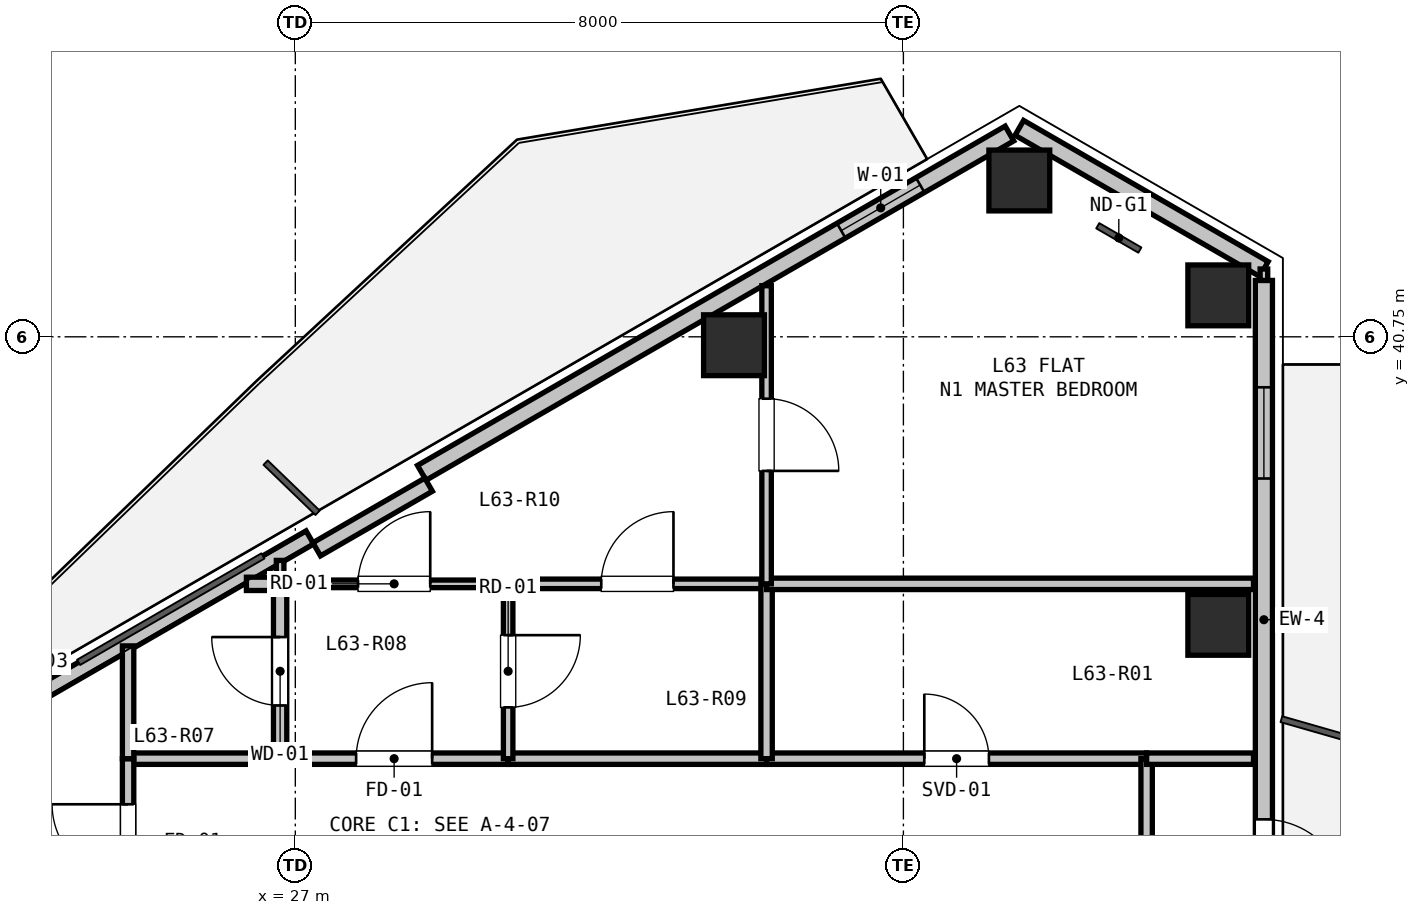
"""IFC4 building model, lengths in metres.
Left out: names, types, materials, properties, quantities, classifications, styles, units other than length and angle.
Written with IfcOpenShell. Run it as: python <this file> out.ifc"""

import sys

from ifc_helpers import new_model, si_unit, direction, frame, frame_2d, origin, origin_2d, place, context, subcontext, project, spatial, rectangle, hollow_rectangle, extrude, element, fill, save


model = new_model("IFC4")
c1 = context("Model", 3, precision=1e-05, world=origin(), true_north=direction((0.0, 1.0)))
c2 = subcontext(c1, "Body", "Model", "MODEL_VIEW")
j1 = project(units=[si_unit("LENGTHUNIT", "METRE"), si_unit("PLANEANGLEUNIT", "RADIAN")], contexts=[c1])
p1 = place(None, origin())
s1 = spatial("IfcSite", under=j1, at=p1, CompositionType="ELEMENT")
p2 = place(p1, origin())
s2 = spatial("IfcBuilding", under=s1, at=p2, CompositionType="ELEMENT")
p3 = place(p2, frame((0.0, 0.0, 226.5)))
s3 = spatial("IfcBuildingStorey", under=s2, at=p3, CompositionType="ELEMENT", Elevation=226.5)
for number, where, z_axis, x_axis in (
    (1, (32.771, 40.639, 0.0), (0.0, 0.0, 1.0), (1.0, 0.0, 0.0)),
    (2, (36.525, 42.807, 0.0), (0.0, 0.0, 1.0), (1.0, 0.0, 0.0)),
    (3, (39.143, 41.295, 0.0), (0.0, 0.0, 1.0), (1.0, 0.0, 0.0)),
    (4, (39.143, 36.961, 0.0), (0.0, 0.0, 1.0), (1.0, 0.0, 0.0)),
):
    element("IfcColumn", number, at=place(p3, frame(where, z_axis=z_axis, x_axis=x_axis)), inside=s3, PredefinedType="COLUMN", context=c2, shape_type="SweptSolid", body=[
        extrude(hollow_rectangle(XDim=0.8, YDim=0.8, WallThickness=0.025, at=origin_2d()), origin(), (0.0, 0.0, 1.0), 3.3),
    ])
p4 = place(p3, frame((36.525, 43.5, 0.0), z_axis=(0.0, 0.0, 1.0), x_axis=(0.866038962515, -0.499976514854, 0.0)))
e5 = element("IfcWall", 5, at=p4, inside=s3, PredefinedType="SOLIDWALL", context=c2, shape_type="SweptSolid", body=[
    extrude(rectangle(XDim=3.716, YDim=0.225, at=frame_2d((1.858, 0.0))), origin(), (0.0, 0.0, 1.0), 2.7),
])
p5 = place(p3, frame((20.066, 33.997, 0.0), z_axis=(0.0, 0.0, 1.0), x_axis=(0.866019557082, 0.500010126649, 0.0)))
e6 = element("IfcWall", 6, at=p5, inside=s3, PredefinedType="PARAPET", context=c2, shape_type="SweptSolid", body=[
    extrude(rectangle(XDim=8.228, YDim=0.2, at=frame_2d((4.114, 0.0))), origin(), (0.0, 0.0, 1.0), 0.2),
])
p6 = place(p3, frame((28.664, 38.96, 0.0), z_axis=(0.0, 0.0, 1.0), x_axis=(0.866026655105, 0.499997832642, 0.0)))
e7 = element("IfcWall", 7, at=p6, inside=s3, PredefinedType="SOLIDWALL", context=c2, shape_type="SweptSolid", body=[
    extrude(rectangle(XDim=8.928, YDim=0.225, at=frame_2d((4.464, 0.0))), origin(), (0.0, 0.0, 1.0), 2.7),
])
p7 = place(p6, frame((6.372, 0.0, 0.9)))
e8 = element("IfcOpeningElement", 8, at=p7, cuts=e7, PredefinedType="OPENING", context=c2, shape_type="SweptSolid", body=[
    extrude(rectangle(XDim=1.2, YDim=1.4, at=frame_2d((0.6, 0.7))), frame((0.0, 0.123, 0.0), z_axis=(0.0, -1.0, 0.0), x_axis=(1.0, 0.0, 0.0)), (0.0, 0.0, 1.0), 0.245),
])
p8 = place(p3, frame((27.281, 37.955, 0.0), z_axis=(0.0, 0.0, 1.0), x_axis=(0.866025371046, 0.500000056704, 0.0)))
e9 = element("IfcWall", 9, at=p8, inside=s3, PredefinedType="PARAPET", context=c2, shape_type="SweptSolid", body=[
    extrude(rectangle(XDim=1.7, YDim=0.2, at=frame_2d((0.85, 0.0))), origin(), (0.0, 0.0, 1.0), 2.7),
])
p9 = place(p3, frame((39.743, 41.492, 0.0), z_axis=(0.0, 0.0, 1.0), x_axis=(0.0, -1.0, 0.0)))
e10 = element("IfcWall", 10, at=p9, inside=s3, PredefinedType="SOLIDWALL", context=c2, shape_type="SweptSolid", body=[
    extrude(rectangle(XDim=8.928, YDim=0.225, at=frame_2d((4.464, 0.0))), origin(), (0.0, 0.0, 1.0), 2.7),
])
p10 = place(p9, frame((7.09, 0.0, 0.0)))
e11 = element("IfcOpeningElement", 11, at=p10, cuts=e10, PredefinedType="OPENING", context=c2, shape_type="SweptSolid", body=[
    extrude(rectangle(XDim=1.1, YDim=2.1, at=frame_2d((0.55, 1.05))), frame((0.0, 0.123, 0.0), z_axis=(0.0, -1.0, 0.0), x_axis=(1.0, 0.0, 0.0)), (0.0, 0.0, 1.0), 0.245),
])
p11 = place(p9, frame((1.406, 0.0, 0.9)))
e12 = element("IfcOpeningElement", 12, at=p11, cuts=e10, PredefinedType="OPENING", context=c2, shape_type="SweptSolid", body=[
    extrude(rectangle(XDim=1.2, YDim=1.4, at=frame_2d((0.6, 0.7))), frame((0.0, 0.123, 0.0), z_axis=(0.0, -1.0, 0.0), x_axis=(1.0, 0.0, 0.0)), (0.0, 0.0, 1.0), 0.245),
])
p12 = place(p3, frame((24.8, 35.2, 0.0), z_axis=(0.0, 0.0, 1.0), x_axis=(1.0, 0.0, 0.0)))
e13 = element("IfcWall", 13, at=p12, inside=s3, PredefinedType="PARTITIONING", context=c2, shape_type="SweptSolid", body=[
    extrude(rectangle(XDim=2.0, YDim=0.15, at=frame_2d((1.0, 0.0))), origin(), (0.0, 0.0, 1.0), 3.08),
])
p13 = place(p3, frame((26.8, 35.2, 0.0), z_axis=(0.0, 0.0, 1.0), x_axis=(1.0, 0.0, 0.0)))
e14 = element("IfcWall", 14, at=p13, inside=s3, PredefinedType="PARTITIONING", context=c2, shape_type="SweptSolid", body=[
    extrude(rectangle(XDim=3.0, YDim=0.15, at=frame_2d((1.5, 0.0))), origin(), (0.0, 0.0, 1.0), 3.08),
])
p14 = place(p13, frame((1.0, 0.0, 0.0)))
e15 = element("IfcOpeningElement", 15, at=p14, cuts=e14, PredefinedType="OPENING", context=c2, shape_type="SweptSolid", body=[
    extrude(rectangle(XDim=1.0, YDim=2.15, at=frame_2d((0.5, 1.075))), frame((0.0, 0.085, 0.0), z_axis=(0.0, -1.0, 0.0), x_axis=(1.0, 0.0, 0.0)), (0.0, 0.0, 1.0), 0.17),
])
p15 = place(p3, frame((29.8, 35.2, 0.0), z_axis=(0.0, 0.0, 1.0), x_axis=(1.0, 0.0, 0.0)))
e16 = element("IfcWall", 16, at=p15, inside=s3, PredefinedType="PARTITIONING", context=c2, shape_type="SweptSolid", body=[
    extrude(rectangle(XDim=3.4, YDim=0.15, at=frame_2d((1.7, 0.0))), origin(), (0.0, 0.0, 1.0), 3.08),
])
p16 = place(p3, frame((33.2, 35.2, 0.0), z_axis=(0.0, 0.0, 1.0), x_axis=(1.0, 0.0, 0.0)))
e17 = element("IfcWall", 17, at=p16, inside=s3, PredefinedType="PARTITIONING", context=c2, shape_type="SweptSolid", body=[
    extrude(rectangle(XDim=5.0, YDim=0.15, at=frame_2d((2.5, 0.0))), origin(), (0.0, 0.0, 1.0), 2.528),
])
p17 = place(p16, frame((2.075, 0.0, 0.0)))
e18 = element("IfcOpeningElement", 18, at=p17, cuts=e17, PredefinedType="OPENING", context=c2, shape_type="SweptSolid", body=[
    extrude(rectangle(XDim=0.85, YDim=2.1, at=frame_2d((0.425, 1.05))), frame((0.0, 0.085, 0.0), z_axis=(0.0, -1.0, 0.0), x_axis=(1.0, 0.0, 0.0)), (0.0, 0.0, 1.0), 0.17),
])
p18 = place(p3, frame((38.2, 35.2, 0.0), z_axis=(0.0, 0.0, 1.0), x_axis=(0.0, -1.0, 0.0)))
e19 = element("IfcWall", 19, at=p18, inside=s3, PredefinedType="PARTITIONING", context=c2, shape_type="SweptSolid", body=[
    extrude(rectangle(XDim=2.45, YDim=0.15, at=frame_2d((1.225, 0.0))), origin(), (0.0, 0.0, 1.0), 3.08),
])
p19 = place(p3, frame((24.8, 33.0, 0.0), z_axis=(0.0, 0.0, 1.0), x_axis=(0.0, 1.0, 0.0)))
e20 = element("IfcWall", 20, at=p19, inside=s3, PredefinedType="PARTITIONING", context=c2, shape_type="SweptSolid", body=[
    extrude(rectangle(XDim=2.2, YDim=0.15, at=frame_2d((1.1, 0.0))), origin(), (0.0, 0.0, 1.0), 2.605),
])
p20 = place(p19, frame((0.6, 0.0, 0.0)))
e21 = element("IfcOpeningElement", 21, at=p20, cuts=e20, PredefinedType="OPENING", context=c2, shape_type="SweptSolid", body=[
    extrude(rectangle(XDim=1.0, YDim=2.15, at=frame_2d((0.5, 1.075))), frame((0.0, 0.085, 0.0), z_axis=(0.0, -1.0, 0.0), x_axis=(1.0, 0.0, 0.0)), (0.0, 0.0, 1.0), 0.17),
])
p21 = place(p3, frame((26.8, 37.5, 0.0), z_axis=(0.0, 0.0, 1.0), x_axis=(1.0, 0.0, 0.0)))
e22 = element("IfcWall", 22, at=p21, inside=s3, PredefinedType="PARTITIONING", context=c2, shape_type="SweptSolid", body=[
    extrude(rectangle(XDim=3.0, YDim=0.1, at=frame_2d((1.5, 0.0))), origin(), (0.0, 0.0, 1.0), 2.365),
])
p22 = place(p21, frame((1.025, 0.0, 0.0)))
e23 = element("IfcOpeningElement", 23, at=p22, cuts=e22, PredefinedType="OPENING", context=c2, shape_type="SweptSolid", body=[
    extrude(rectangle(XDim=0.95, YDim=2.1, at=frame_2d((0.475, 1.05))), frame((0.0, 0.06, 0.0), z_axis=(0.0, -1.0, 0.0), x_axis=(1.0, 0.0, 0.0)), (0.0, 0.0, 1.0), 0.12),
])
p23 = place(p3, frame((29.8, 37.5, 0.0), z_axis=(0.0, 0.0, 1.0), x_axis=(0.0, -1.0, 0.0)))
e24 = element("IfcWall", 24, at=p23, inside=s3, PredefinedType="PARTITIONING", context=c2, shape_type="SweptSolid", body=[
    extrude(rectangle(XDim=2.3, YDim=0.125, at=frame_2d((1.15, 0.0))), origin(), (0.0, 0.0, 1.0), 3.08),
])
p24 = place(p23, frame((0.675, 0.0, 0.0)))
e25 = element("IfcOpeningElement", 25, at=p24, cuts=e24, PredefinedType="OPENING", context=c2, shape_type="SweptSolid", body=[
    extrude(rectangle(XDim=0.95, YDim=2.1, at=frame_2d((0.475, 1.05))), frame((0.0, 0.073, 0.0), z_axis=(0.0, -1.0, 0.0), x_axis=(1.0, 0.0, 0.0)), (0.0, 0.0, 1.0), 0.145),
])
p25 = place(p3, frame((26.8, 35.2, 0.0), z_axis=(0.0, 0.0, 1.0), x_axis=(0.0, 1.0, 0.0)))
e26 = element("IfcWall", 26, at=p25, inside=s3, PredefinedType="PLUMBINGWALL", context=c2, shape_type="SweptSolid", body=[
    extrude(rectangle(XDim=2.3, YDim=0.175, at=frame_2d((1.15, 0.0))), origin(), (0.0, 0.0, 1.0), 2.365),
])
p26 = place(p25, frame((0.7, 0.0, 0.0)))
e27 = element("IfcOpeningElement", 27, at=p26, cuts=e26, PredefinedType="OPENING", context=c2, shape_type="SweptSolid", body=[
    extrude(rectangle(XDim=0.9, YDim=2.1, at=frame_2d((0.45, 1.05))), frame((0.0, 0.097, 0.0), z_axis=(0.0, -1.0, 0.0), x_axis=(1.0, 0.0, 0.0)), (0.0, 0.0, 1.0), 0.195),
])
p27 = place(p3, frame((24.8, 35.2, 0.0), z_axis=(0.0, 0.0, 1.0), x_axis=(0.0, 1.0, 0.0)))
e28 = element("IfcWall", 28, at=p27, inside=s3, PredefinedType="PARTITIONING", context=c2, shape_type="SweptSolid", body=[
    extrude(rectangle(XDim=1.484, YDim=0.15, at=frame_2d((0.742, 0.0))), origin(), (0.0, 0.0, 1.0), 2.365),
])
p28 = place(p3, frame((26.357, 37.5, 0.0), z_axis=(0.0, 0.0, 1.0), x_axis=(1.0, 0.0, 0.0)))
e29 = element("IfcWall", 29, at=p28, inside=s3, PredefinedType="PLUMBINGWALL", context=c2, shape_type="SweptSolid", body=[
    extrude(rectangle(XDim=0.428, YDim=0.175, at=frame_2d((0.214, 0.0))), origin(), (0.0, 0.0, 1.0), 3.08),
])
p29 = place(p3, frame((29.8, 37.5, 0.0), z_axis=(0.0, 0.0, 1.0), x_axis=(1.0, 0.0, 0.0)))
e30 = element("IfcWall", 30, at=p29, inside=s3, PredefinedType="PARTITIONING", context=c2, shape_type="SweptSolid", body=[
    extrude(rectangle(XDim=3.4, YDim=0.125, at=frame_2d((1.7, 0.0))), origin(), (0.0, 0.0, 1.0), 3.08),
])
p30 = place(p29, frame((1.225, 0.0, 0.0)))
e31 = element("IfcOpeningElement", 31, at=p30, cuts=e30, PredefinedType="OPENING", context=c2, shape_type="SweptSolid", body=[
    extrude(rectangle(XDim=0.95, YDim=2.1, at=frame_2d((0.475, 1.05))), frame((0.0, 0.073, 0.0), z_axis=(0.0, -1.0, 0.0), x_axis=(1.0, 0.0, 0.0)), (0.0, 0.0, 1.0), 0.145),
])
p31 = place(p3, frame((33.2, 37.5, 0.0), z_axis=(0.0, 0.0, 1.0), x_axis=(0.0, -1.0, 0.0)))
e32 = element("IfcWall", 32, at=p31, inside=s3, PredefinedType="PARTITIONING", context=c2, shape_type="SweptSolid", body=[
    extrude(rectangle(XDim=2.3, YDim=0.15, at=frame_2d((1.15, 0.0))), origin(), (0.0, 0.0, 1.0), 3.08),
])
p32 = place(p3, frame((39.606, 35.2, 0.0), z_axis=(0.0, 0.0, 1.0), x_axis=(-1.0, 0.0, 0.0)))
e33 = element("IfcWall", 33, at=p32, inside=s3, PredefinedType="PARTITIONING", context=c2, shape_type="SweptSolid", body=[
    extrude(rectangle(XDim=1.406, YDim=0.15, at=frame_2d((0.703, 0.0))), origin(), (0.0, 0.0, 1.0), 2.365),
])
p33 = place(p3, frame((33.2, 37.5, 0.0), z_axis=(0.0, 0.0, 1.0), x_axis=(1.0, 0.0, 0.0)))
e34 = element("IfcWall", 34, at=p33, inside=s3, PredefinedType="PARTITIONING", context=c2, shape_type="SweptSolid", body=[
    extrude(rectangle(XDim=6.406, YDim=0.15, at=frame_2d((3.203, 0.0))), origin(), (0.0, 0.0, 1.0), 2.528),
])
p34 = place(p3, frame((26.8, 37.5, 0.0), z_axis=(0.0, 0.0, 1.0), x_axis=(0.0, 1.0, 0.0)))
e35 = element("IfcWall", 35, at=p34, inside=s3, PredefinedType="PARTITIONING", context=c2, shape_type="SweptSolid", body=[
    extrude(rectangle(XDim=0.308, YDim=0.1, at=frame_2d((0.154, 0.0))), origin(), (0.0, 0.0, 1.0), 3.08),
])
p35 = place(p3, frame((33.2, 41.422, 0.0), z_axis=(0.0, 0.0, 1.0), x_axis=(0.0, -1.0, 0.0)))
e36 = element("IfcWall", 36, at=p35, inside=s3, PredefinedType="PARTITIONING", context=c2, shape_type="SweptSolid", body=[
    extrude(rectangle(XDim=3.922, YDim=0.125, at=frame_2d((1.961, 0.0))), origin(), (0.0, 0.0, 1.0), 2.805),
])
p36 = place(p35, frame((1.486, 0.0, 0.0)))
e37 = element("IfcOpeningElement", 37, at=p36, cuts=e36, PredefinedType="OPENING", context=c2, shape_type="SweptSolid", body=[
    extrude(rectangle(XDim=0.95, YDim=2.1, at=frame_2d((0.475, 1.05))), frame((0.0, 0.073, 0.0), z_axis=(0.0, -1.0, 0.0), x_axis=(1.0, 0.0, 0.0)), (0.0, 0.0, 1.0), 0.145),
])
p37 = place(p3, frame((39.743, 41.642, 0.0), z_axis=(0.0, 0.0, 1.0), x_axis=(0.0, -1.0, 0.0)))
e38 = element("IfcWall", 38, at=p37, inside=s3, PredefinedType="PARTITIONING", context=c2, shape_type="SweptSolid", body=[
    extrude(rectangle(XDim=0.15, YDim=0.1, at=frame_2d((0.075, 0.0))), origin(), (0.0, 0.0, 1.0), 3.08),
])
p38 = place(p7, origin())
e39 = element("IfcWindow", 39, at=p38, inside=s3, PartitioningType="SINGLE_PANEL", PredefinedType="WINDOW", context=c2, shape_type="SweptSolid", body=[
    extrude(rectangle(XDim=1.2, YDim=1.4, at=frame_2d((0.6, 0.7))), frame((0.0, 0.03, 0.0), z_axis=(0.0, -1.0, 0.0), x_axis=(1.0, 0.0, 0.0)), (0.0, 0.0, 1.0), 0.06),
])
fill(e8, e39)
p39 = place(p10, origin())
e40 = element("IfcDoor", 40, at=p39, inside=s3, OperationType="SINGLE_SWING_RIGHT", PredefinedType="DOOR", context=c2, shape_type="SweptSolid", body=[
    extrude(rectangle(XDim=1.1, YDim=2.1, at=frame_2d((0.55, 1.05))), frame((0.0, 0.025, 0.0), z_axis=(0.0, -1.0, 0.0), x_axis=(1.0, 0.0, 0.0)), (0.0, 0.0, 1.0), 0.05),
])
fill(e11, e40)
p40 = place(p11, origin())
e41 = element("IfcWindow", 41, at=p40, inside=s3, PartitioningType="SINGLE_PANEL", PredefinedType="WINDOW", context=c2, shape_type="SweptSolid", body=[
    extrude(rectangle(XDim=1.2, YDim=1.4, at=frame_2d((0.6, 0.7))), frame((0.0, 0.03, 0.0), z_axis=(0.0, -1.0, 0.0), x_axis=(1.0, 0.0, 0.0)), (0.0, 0.0, 1.0), 0.06),
])
fill(e12, e41)
p41 = place(p14, origin())
e42 = element("IfcDoor", 42, at=p41, inside=s3, OperationType="SINGLE_SWING_RIGHT", PredefinedType="DOOR", context=c2, shape_type="SweptSolid", body=[
    extrude(rectangle(XDim=1.0, YDim=2.15, at=frame_2d((0.5, 1.075))), frame((0.0, 0.025, 0.0), z_axis=(0.0, -1.0, 0.0), x_axis=(1.0, 0.0, 0.0)), (0.0, 0.0, 1.0), 0.05),
])
fill(e15, e42)
p42 = place(p17, origin())
e43 = element("IfcDoor", 43, at=p42, inside=s3, OperationType="SINGLE_SWING_LEFT", PredefinedType="DOOR", context=c2, shape_type="SweptSolid", body=[
    extrude(rectangle(XDim=0.85, YDim=2.1, at=frame_2d((0.425, 1.05))), frame((0.0, 0.025, 0.0), z_axis=(0.0, -1.0, 0.0), x_axis=(1.0, 0.0, 0.0)), (0.0, 0.0, 1.0), 0.05),
])
fill(e18, e43)
p43 = place(p20, origin())
e44 = element("IfcDoor", 44, at=p43, inside=s3, OperationType="SINGLE_SWING_RIGHT", PredefinedType="DOOR", context=c2, shape_type="SweptSolid", body=[
    extrude(rectangle(XDim=1.0, YDim=2.15, at=frame_2d((0.5, 1.075))), frame((0.0, 0.025, 0.0), z_axis=(0.0, -1.0, 0.0), x_axis=(1.0, 0.0, 0.0)), (0.0, 0.0, 1.0), 0.05),
])
fill(e21, e44)
p44 = place(p26, origin())
e45 = element("IfcDoor", 45, at=p44, inside=s3, OperationType="SINGLE_SWING_RIGHT", PredefinedType="DOOR", context=c2, shape_type="SweptSolid", body=[
    extrude(rectangle(XDim=0.9, YDim=2.1, at=frame_2d((0.45, 1.05))), frame((0.0, 0.025, 0.0), z_axis=(0.0, -1.0, 0.0), x_axis=(1.0, 0.0, 0.0)), (0.0, 0.0, 1.0), 0.05),
])
fill(e27, e45)
p45 = place(p24, origin())
e46 = element("IfcDoor", 46, at=p45, inside=s3, OperationType="SINGLE_SWING_LEFT", PredefinedType="DOOR", context=c2, shape_type="SweptSolid", body=[
    extrude(rectangle(XDim=0.95, YDim=2.1, at=frame_2d((0.475, 1.05))), frame((0.0, 0.025, 0.0), z_axis=(0.0, -1.0, 0.0), x_axis=(1.0, 0.0, 0.0)), (0.0, 0.0, 1.0), 0.05),
])
fill(e25, e46)
p46 = place(p22, origin())
e47 = element("IfcDoor", 47, at=p46, inside=s3, OperationType="SINGLE_SWING_RIGHT", PredefinedType="DOOR", context=c2, shape_type="SweptSolid", body=[
    extrude(rectangle(XDim=0.95, YDim=2.1, at=frame_2d((0.475, 1.05))), frame((0.0, 0.025, 0.0), z_axis=(0.0, -1.0, 0.0), x_axis=(1.0, 0.0, 0.0)), (0.0, 0.0, 1.0), 0.05),
])
fill(e23, e47)
p47 = place(p30, origin())
e48 = element("IfcDoor", 48, at=p47, inside=s3, OperationType="SINGLE_SWING_RIGHT", PredefinedType="DOOR", context=c2, shape_type="SweptSolid", body=[
    extrude(rectangle(XDim=0.95, YDim=2.1, at=frame_2d((0.475, 1.05))), frame((0.0, 0.025, 0.0), z_axis=(0.0, -1.0, 0.0), x_axis=(1.0, 0.0, 0.0)), (0.0, 0.0, 1.0), 0.05),
])
fill(e31, e48)
p48 = place(p36, origin())
e49 = element("IfcDoor", 49, at=p48, inside=s3, OperationType="SINGLE_SWING_RIGHT", PredefinedType="DOOR", context=c2, shape_type="SweptSolid", body=[
    extrude(rectangle(XDim=0.95, YDim=2.1, at=frame_2d((0.475, 1.05))), frame((0.0, 0.025, 0.0), z_axis=(0.0, -1.0, 0.0), x_axis=(1.0, 0.0, 0.0)), (0.0, 0.0, 1.0), 0.05),
])
fill(e37, e49)
save(model, sys.argv[1])
